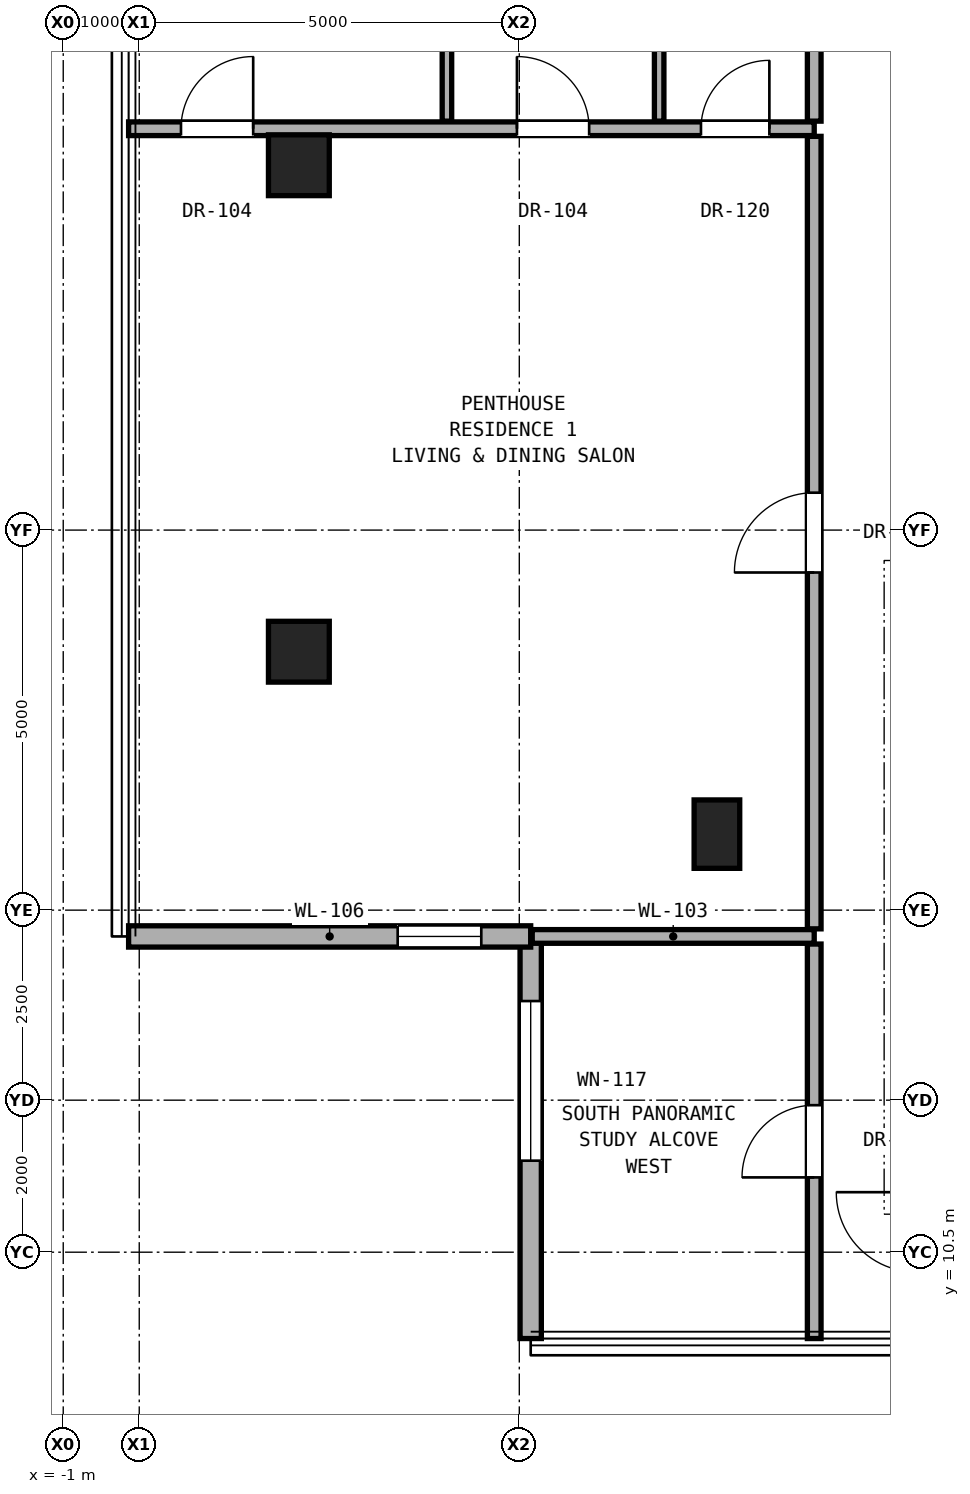
"""IFC4 building model, lengths in metres.
Left out: names, types, materials, properties, quantities, classifications, styles, units other than length and angle.
Written with IfcOpenShell. Run it as: python <this file> out.ifc"""

import sys

from ifc_helpers import new_model, si_unit, direction, frame, frame_2d, origin, origin_2d, place, context, subcontext, project, spatial, rectangle, hollow_rectangle, extrude, element, fill, save


model = new_model("IFC4")
c1 = context("Model", 3, precision=1e-05, world=origin(), true_north=direction((0.0, 1.0)))
c2 = subcontext(c1, "Body", "Model", "MODEL_VIEW")
j1 = project(units=[si_unit("LENGTHUNIT", "METRE"), si_unit("PLANEANGLEUNIT", "RADIAN")], contexts=[c1])
p1 = place(None, origin())
s1 = spatial("IfcSite", under=j1, at=p1, CompositionType="ELEMENT")
p2 = place(p1, origin())
s2 = spatial("IfcBuilding", under=s1, at=p2, CompositionType="ELEMENT")
p3 = place(p2, frame((0.0, 0.0, 226.0)))
s3 = spatial("IfcBuildingStorey", under=s2, at=p3, CompositionType="ELEMENT", Elevation=226.0)
for number, where, z_axis, x_axis in (
    (1, (2.1, 18.4, 0.0), (0.0, 0.0, 1.0), (1.0, 0.0, 0.0)),
    (2, (2.1, 24.8, 0.0), (0.0, 0.0, 1.0), (1.0, 0.0, 0.0)),
):
    element("IfcColumn", number, at=place(p3, frame(where, z_axis=z_axis, x_axis=x_axis)), inside=s3, PredefinedType="COLUMN", context=c2, shape_type="SweptSolid", body=[
        extrude(hollow_rectangle(XDim=0.8, YDim=0.8, WallThickness=0.045, at=origin_2d()), origin(), (0.0, 0.0, 1.0), 3.3),
    ])
p4 = place(p3, frame((7.6, 16.0, 0.0), z_axis=(0.0, 0.0, 1.0), x_axis=(1.0, 0.0, 0.0)))
e3 = element("IfcColumn", 3, at=p4, inside=s3, PredefinedType="PILASTER", context=c2, shape_type="SweptSolid", body=[
    extrude(rectangle(XDim=0.6, YDim=0.9, at=origin_2d()), origin(), (0.0, 0.0, 1.0), 3.3),
])
p5 = place(p3, frame((5.15, 14.654, 0.0), z_axis=(0.0, 0.0, 1.0), x_axis=(0.0, -1.0, 0.0)))
e4 = element("IfcWall", 4, at=p5, inside=s3, PredefinedType="SOLIDWALL", context=c2, shape_type="SweptSolid", body=[
    extrude(rectangle(XDim=5.29, YDim=0.28, at=frame_2d((2.645, 0.0))), origin(), (0.0, 0.0, 1.0), 3.08),
])
p6 = place(p5, frame((0.85, 0.0, 0.73)))
e5 = element("IfcOpeningElement", 5, at=p6, cuts=e4, PredefinedType="OPENING", context=c2, shape_type="SweptSolid", body=[
    extrude(rectangle(XDim=2.1, YDim=2.2, at=frame_2d((1.05, 1.1))), frame((0.0, 0.15, 0.0), z_axis=(0.0, -1.0, 0.0), x_axis=(1.0, 0.0, 0.0)), (0.0, 0.0, 1.0), 0.3),
])
p7 = place(p3, frame((-0.14, 14.654, 0.0), z_axis=(0.0, 0.0, 1.0), x_axis=(1.0, 0.0, 0.0)))
e6 = element("IfcWall", 6, at=p7, inside=s3, PredefinedType="SOLIDWALL", context=c2, shape_type="SweptSolid", body=[
    extrude(rectangle(XDim=5.29, YDim=0.28, at=frame_2d((2.645, 0.0))), origin(), (0.0, 0.0, 1.0), 3.08),
])
p8 = place(p7, frame((3.54, 0.0, 0.85)))
e7 = element("IfcOpeningElement", 7, at=p8, cuts=e6, PredefinedType="OPENING", context=c2, shape_type="SweptSolid", body=[
    extrude(rectangle(XDim=1.1, YDim=2.0, at=frame_2d((0.55, 1.0))), frame((0.0, 0.15, 0.0), z_axis=(0.0, -1.0, 0.0), x_axis=(1.0, 0.0, 0.0)), (0.0, 0.0, 1.0), 0.3),
])
p9 = place(p3, frame((5.17, 14.654, 0.0), z_axis=(0.0, 0.0, 1.0), x_axis=(1.0, 0.0, 0.0)))
e8 = element("IfcWall", 8, at=p9, inside=s3, PredefinedType="PARTITIONING", context=c2, shape_type="SweptSolid", body=[
    extrude(rectangle(XDim=3.71, YDim=0.18, at=frame_2d((1.855, 0.0))), origin(), (0.0, 0.0, 1.0), 3.1),
])
p10 = place(p3, frame((-0.14, 25.28, 0.0), z_axis=(0.0, 0.0, 1.0), x_axis=(1.0, 0.0, 0.0)))
e9 = element("IfcWall", 9, at=p10, inside=s3, PredefinedType="PARTITIONING", context=c2, shape_type="SweptSolid", body=[
    extrude(rectangle(XDim=9.02, YDim=0.18, at=frame_2d((4.51, 0.0))), origin(), (0.0, 0.0, 1.0), 2.319),
])
p11 = place(p10, frame((0.689, 0.0, 0.0)))
e10 = element("IfcOpeningElement", 10, at=p11, cuts=e9, PredefinedType="OPENING", context=c2, shape_type="SweptSolid", body=[
    extrude(rectangle(XDim=0.95, YDim=2.15, at=frame_2d((0.475, 1.075))), frame((0.0, 0.1, 0.0), z_axis=(0.0, -1.0, 0.0), x_axis=(1.0, 0.0, 0.0)), (0.0, 0.0, 1.0), 0.2),
])
p12 = place(p10, frame((5.109, 0.0, 0.0)))
e11 = element("IfcOpeningElement", 11, at=p12, cuts=e9, PredefinedType="OPENING", context=c2, shape_type="SweptSolid", body=[
    extrude(rectangle(XDim=0.95, YDim=2.15, at=frame_2d((0.475, 1.075))), frame((0.0, 0.1, 0.0), z_axis=(0.0, -1.0, 0.0), x_axis=(1.0, 0.0, 0.0)), (0.0, 0.0, 1.0), 0.2),
])
p13 = place(p10, frame((7.53, 0.0, 0.0)))
e12 = element("IfcOpeningElement", 12, at=p13, cuts=e9, PredefinedType="OPENING", context=c2, shape_type="SweptSolid", body=[
    extrude(rectangle(XDim=0.9, YDim=2.1, at=frame_2d((0.45, 1.05))), frame((0.0, 0.1, 0.0), z_axis=(0.0, -1.0, 0.0), x_axis=(1.0, 0.0, 0.0)), (0.0, 0.0, 1.0), 0.2),
])
for number, where, z_axis, x_axis in (
    (13, (4.048, 25.38, 0.0), (0.0, 0.0, 1.0), (0.0, 1.0, 0.0)),
    (14, (6.84, 25.38, 0.0), (0.0, 0.0, 1.0), (0.0, 1.0, 0.0)),
):
    element("IfcWall", number, at=place(p3, frame(where, z_axis=z_axis, x_axis=x_axis)), inside=s3, PredefinedType="PARTITIONING", context=c2, shape_type="SweptSolid", body=[
        extrude(rectangle(XDim=2.548, YDim=0.125, at=frame_2d((1.274, 0.0))), origin(), (0.0, 0.0, 1.0), 3.1),
    ])
p14 = place(p3, frame((8.88, 9.364, 0.0), z_axis=(0.0, 0.0, 1.0), x_axis=(0.0, 1.0, 0.0)))
e15 = element("IfcWall", 15, at=p14, inside=s3, PredefinedType="PARTITIONING", context=c2, shape_type="SweptSolid", body=[
    extrude(rectangle(XDim=5.19, YDim=0.18, at=frame_2d((2.595, 0.0))), origin(), (0.0, 0.0, 1.0), 3.1),
])
p15 = place(p14, frame((2.12, 0.0, 0.0)))
e16 = element("IfcOpeningElement", 16, at=p15, cuts=e15, PredefinedType="OPENING", context=c2, shape_type="SweptSolid", body=[
    extrude(rectangle(XDim=0.95, YDim=2.15, at=frame_2d((0.475, 1.075))), frame((0.0, 0.1, 0.0), z_axis=(0.0, -1.0, 0.0), x_axis=(1.0, 0.0, 0.0)), (0.0, 0.0, 1.0), 0.2),
])
p16 = place(p3, frame((8.88, 14.754, 0.0), z_axis=(0.0, 0.0, 1.0), x_axis=(0.0, 1.0, 0.0)))
e17 = element("IfcWall", 17, at=p16, inside=s3, PredefinedType="PARTITIONING", context=c2, shape_type="SweptSolid", body=[
    extrude(rectangle(XDim=10.426, YDim=0.18, at=frame_2d((5.213, 0.0))), origin(), (0.0, 0.0, 1.0), 2.396),
])
p17 = place(p16, frame((4.688, 0.0, 0.0)))
e18 = element("IfcOpeningElement", 18, at=p17, cuts=e17, PredefinedType="OPENING", context=c2, shape_type="SweptSolid", body=[
    extrude(rectangle(XDim=1.05, YDim=2.2, at=frame_2d((0.525, 1.1))), frame((0.0, 0.1, 0.0), z_axis=(0.0, -1.0, 0.0), x_axis=(1.0, 0.0, 0.0)), (0.0, 0.0, 1.0), 0.2),
])
p18 = place(p3, frame((8.88, 25.38, 0.0), z_axis=(0.0, 0.0, 1.0), x_axis=(0.0, 1.0, 0.0)))
e19 = element("IfcWall", 19, at=p18, inside=s3, PredefinedType="PARTITIONING", context=c2, shape_type="SweptSolid", body=[
    extrude(rectangle(XDim=2.548, YDim=0.18, at=frame_2d((1.274, 0.0))), origin(), (0.0, 0.0, 1.0), 3.1),
])
p19 = place(p6, origin())
e20 = element("IfcWindow", 20, at=p19, inside=s3, PartitioningType="SINGLE_PANEL", PredefinedType="WINDOW", context=c2, shape_type="SweptSolid", body=[
    extrude(rectangle(XDim=2.1, YDim=2.2, at=frame_2d((1.05, 1.1))), frame((0.0, 0.03, 0.0), z_axis=(0.0, -1.0, 0.0), x_axis=(1.0, 0.0, 0.0)), (0.0, 0.0, 1.0), 0.06),
])
fill(e5, e20)
p20 = place(p8, origin())
e21 = element("IfcWindow", 21, at=p20, inside=s3, PartitioningType="SINGLE_PANEL", PredefinedType="WINDOW", context=c2, shape_type="SweptSolid", body=[
    extrude(rectangle(XDim=1.1, YDim=2.0, at=frame_2d((0.55, 1.0))), frame((0.0, 0.03, 0.0), z_axis=(0.0, -1.0, 0.0), x_axis=(1.0, 0.0, 0.0)), (0.0, 0.0, 1.0), 0.06),
])
fill(e7, e21)
p21 = place(p17, origin())
e22 = element("IfcDoor", 22, at=p21, inside=s3, OperationType="SINGLE_SWING_LEFT", PredefinedType="DOOR", context=c2, shape_type="SweptSolid", body=[
    extrude(rectangle(XDim=1.05, YDim=2.2, at=frame_2d((0.525, 1.1))), frame((0.0, 0.025, 0.0), z_axis=(0.0, -1.0, 0.0), x_axis=(1.0, 0.0, 0.0)), (0.0, 0.0, 1.0), 0.05),
])
fill(e18, e22)
p22 = place(p11, origin())
e23 = element("IfcDoor", 23, at=p22, inside=s3, OperationType="SINGLE_SWING_RIGHT", PredefinedType="DOOR", context=c2, shape_type="SweptSolid", body=[
    extrude(rectangle(XDim=0.95, YDim=2.15, at=frame_2d((0.475, 1.075))), frame((0.0, 0.025, 0.0), z_axis=(0.0, -1.0, 0.0), x_axis=(1.0, 0.0, 0.0)), (0.0, 0.0, 1.0), 0.05),
])
fill(e10, e23)
p23 = place(p12, origin())
e24 = element("IfcDoor", 24, at=p23, inside=s3, OperationType="SINGLE_SWING_LEFT", PredefinedType="DOOR", context=c2, shape_type="SweptSolid", body=[
    extrude(rectangle(XDim=0.95, YDim=2.15, at=frame_2d((0.475, 1.075))), frame((0.0, 0.025, 0.0), z_axis=(0.0, -1.0, 0.0), x_axis=(1.0, 0.0, 0.0)), (0.0, 0.0, 1.0), 0.05),
])
fill(e11, e24)
p24 = place(p13, origin())
e25 = element("IfcDoor", 25, at=p24, inside=s3, OperationType="SINGLE_SWING_RIGHT", PredefinedType="DOOR", context=c2, shape_type="SweptSolid", body=[
    extrude(rectangle(XDim=0.9, YDim=2.1, at=frame_2d((0.45, 1.05))), frame((0.0, 0.025, 0.0), z_axis=(0.0, -1.0, 0.0), x_axis=(1.0, 0.0, 0.0)), (0.0, 0.0, 1.0), 0.05),
])
fill(e12, e25)
p25 = place(p15, origin())
e26 = element("IfcDoor", 26, at=p25, inside=s3, OperationType="SINGLE_SWING_LEFT", PredefinedType="DOOR", context=c2, shape_type="SweptSolid", body=[
    extrude(rectangle(XDim=0.95, YDim=2.15, at=frame_2d((0.475, 1.075))), frame((0.0, 0.025, 0.0), z_axis=(0.0, -1.0, 0.0), x_axis=(1.0, 0.0, 0.0)), (0.0, 0.0, 1.0), 0.05),
])
fill(e16, e26)
save(model, sys.argv[1])
